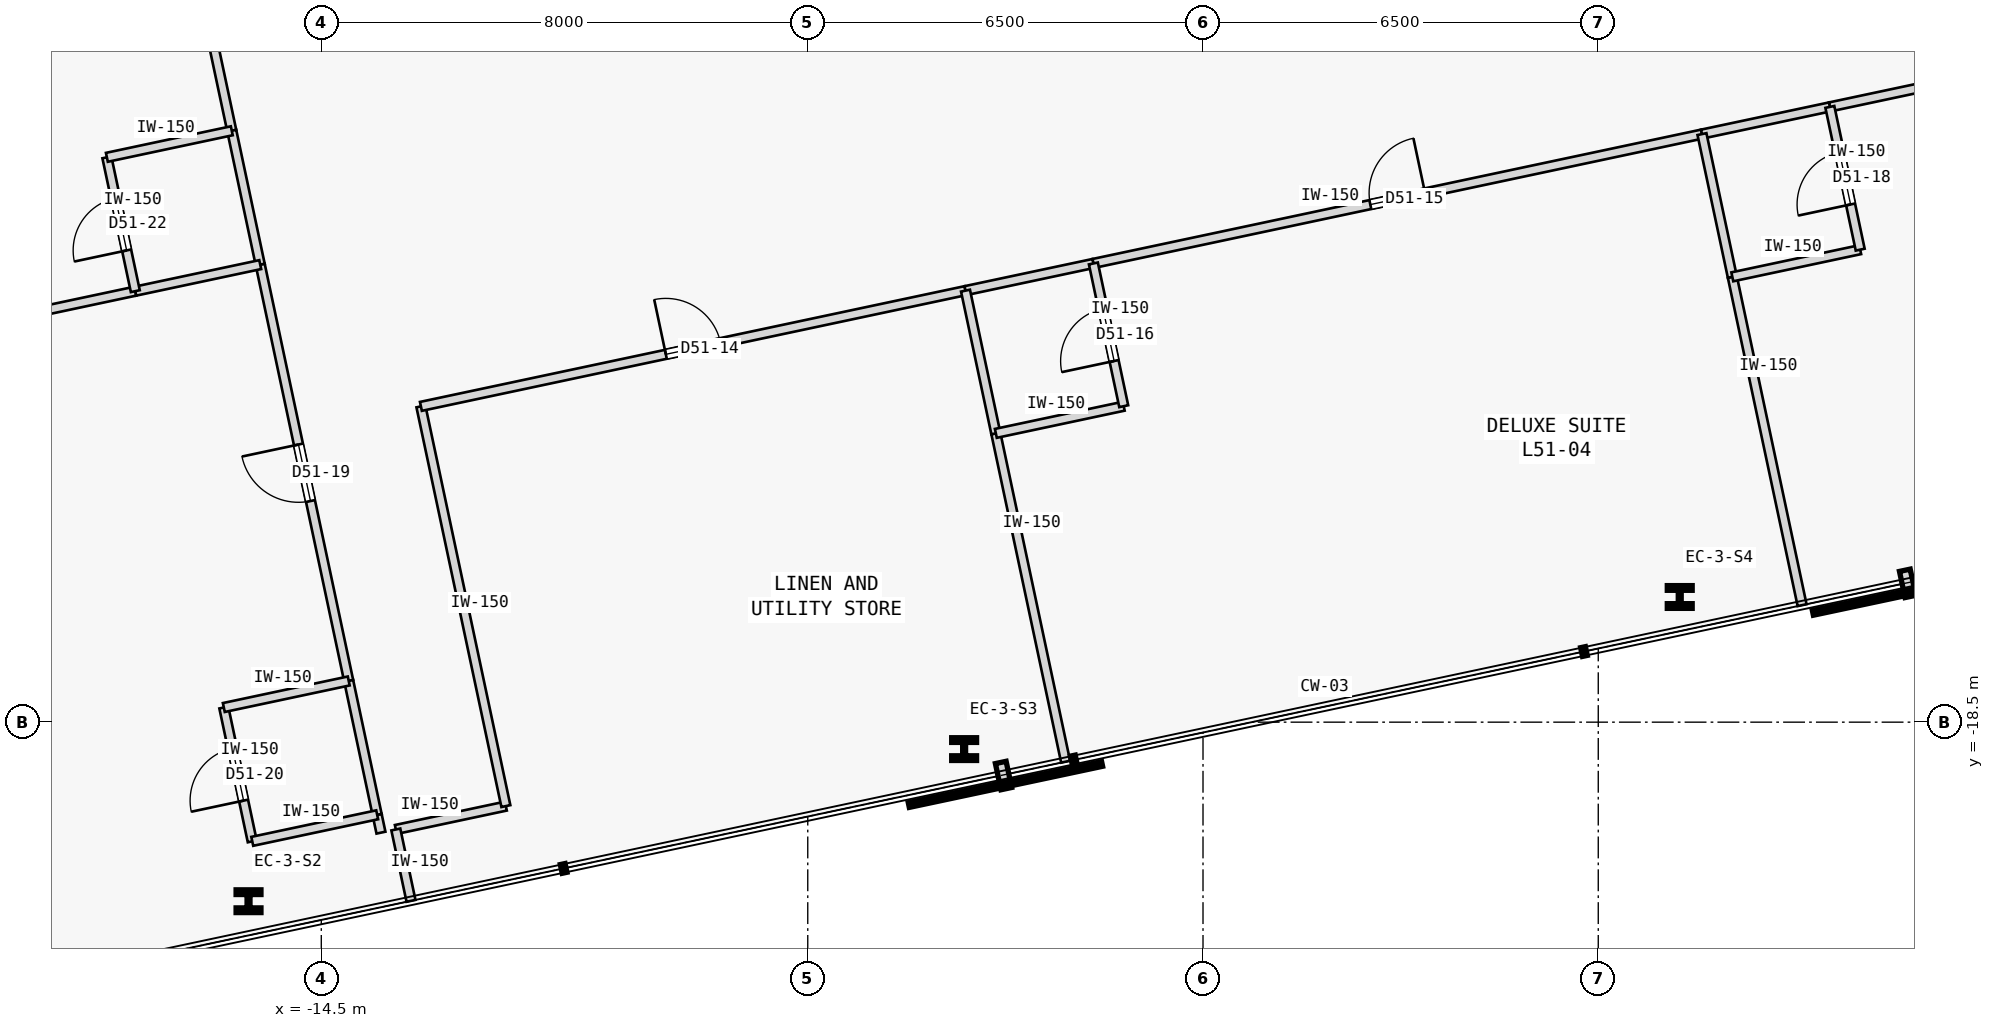
"""IFC4 building model, lengths in metres.
Left out: names, types, materials, properties, quantities, classifications, styles, units other than length and angle.
Written with IfcOpenShell. Run it as: python <this file> out.ifc"""

import sys

from ifc_helpers import new_model, si_unit, direction, frame, frame_2d, origin, origin_2d, place, context, subcontext, project, spatial, rectangle, i_section, extrude, element, fill, save


model = new_model("IFC4")
c1 = context("Model", 3, precision=1e-05, world=origin(), true_north=direction((0.0, 1.0)))
c2 = subcontext(c1, "Body", "Model", "MODEL_VIEW")
j1 = project(units=[si_unit("LENGTHUNIT", "METRE"), si_unit("PLANEANGLEUNIT", "RADIAN")], contexts=[c1])
p1 = place(None, origin())
s1 = spatial("IfcSite", under=j1, at=p1, CompositionType="ELEMENT")
p2 = place(p1, origin())
s2 = spatial("IfcBuilding", under=s1, at=p2, CompositionType="ELEMENT")
p3 = place(p2, frame((0.0, 0.0, 195.6)))
s3 = spatial("IfcBuildingStorey", under=s2, at=p3, CompositionType="ELEMENT", Elevation=195.6)
for number, where, z_axis, x_axis in (
    (1, (-15.697, -21.444, 0.0), (0.0, 0.0, 1.0), (1.0, 0.0, 0.0)),
    (2, (-3.928, -18.943, 0.0), (0.0, 0.0, 1.0), (1.0, 0.0, 0.0)),
    (3, (7.84, -16.441, 0.0), (0.0, 0.0, 1.0), (1.0, 0.0, 0.0)),
):
    element("IfcColumn", number, at=place(p3, frame(where, z_axis=z_axis, x_axis=x_axis)), inside=s3, PredefinedType="COLUMN", context=c2, shape_type="SweptSolid", body=[
        extrude(i_section(OverallWidth=0.409, OverallDepth=0.374, WebThickness=0.048, FlangeThickness=0.077, FilletRadius=0.015, at=origin_2d()), origin(), (0.0, 0.0, 1.0), 3.4),
    ])
p4 = place(p3, frame((-13.274, -20.265, 0.0), z_axis=(0.0, 0.0, 1.0), x_axis=(0.978160192495, 0.207852442415, 0.0)))
e4 = element("IfcWall", 4, at=p4, inside=s3, PredefinedType="PARTITIONING", context=c2, shape_type="SweptSolid", body=[
    extrude(rectangle(XDim=1.85, YDim=0.15, at=frame_2d((0.925, 0.0))), origin(), (0.0, 0.0, 1.0), 3.175),
])
p5 = place(p3, frame((-11.465, -19.88, 0.0), z_axis=(0.0, 0.0, 1.0), x_axis=(-0.207916109912, 0.978146661416, 0.0)))
e5 = element("IfcWall", 5, at=p5, inside=s3, PredefinedType="PARTITIONING", context=c2, shape_type="SweptSolid", body=[
    extrude(rectangle(XDim=6.72, YDim=0.15, at=frame_2d((3.36, 0.0))), origin(), (0.0, 0.0, 1.0), 3.175),
])
p6 = place(p3, frame((-12.862, -13.307, 0.0), z_axis=(0.0, 0.0, 1.0), x_axis=(0.978149904805, 0.207900850719, 0.0)))
e6 = element("IfcWall", 6, at=p6, inside=s3, PredefinedType="PARTITIONING", context=c2, shape_type="SweptSolid", body=[
    extrude(rectangle(XDim=9.156, YDim=0.15, at=frame_2d((4.578, 0.0))), origin(), (0.0, 0.0, 1.0), 3.175),
])
p7 = place(p6, frame((4.118, 0.0, 0.0)))
e7 = element("IfcOpeningElement", 7, at=p7, cuts=e6, PredefinedType="OPENING", context=c2, shape_type="SweptSolid", body=[
    extrude(rectangle(XDim=0.92, YDim=2.15, at=frame_2d((0.46, 1.075))), frame((0.0, 0.085, 0.0), z_axis=(0.0, -1.0, 0.0), x_axis=(1.0, 0.0, 0.0)), (0.0, 0.0, 1.0), 0.17),
])
p8 = place(p3, frame((-1.803, -10.957, 0.0), z_axis=(0.0, 0.0, 1.0), x_axis=(0.978145386425, 0.207922108048, 0.0)))
e8 = element("IfcWall", 8, at=p8, inside=s3, PredefinedType="PARTITIONING", context=c2, shape_type="SweptSolid", body=[
    extrude(rectangle(XDim=10.232, YDim=0.15, at=frame_2d((5.116, 0.0))), origin(), (0.0, 0.0, 1.0), 3.175),
])
p9 = place(p8, frame((4.656, 0.0, 0.0)))
e9 = element("IfcOpeningElement", 9, at=p9, cuts=e8, PredefinedType="OPENING", context=c2, shape_type="SweptSolid", body=[
    extrude(rectangle(XDim=0.92, YDim=2.15, at=frame_2d((0.46, 1.075))), frame((0.0, 0.085, 0.0), z_axis=(0.0, -1.0, 0.0), x_axis=(1.0, 0.0, 0.0)), (0.0, 0.0, 1.0), 0.17),
])
p10 = place(p3, frame((-3.906, -11.404, 0.0), z_axis=(0.0, 0.0, 1.0), x_axis=(0.978146728319, 0.207915795165, 0.0)))
e10 = element("IfcWall", 10, at=p10, inside=s3, PredefinedType="PARTITIONING", context=c2, shape_type="SweptSolid", body=[
    extrude(rectangle(XDim=2.15, YDim=0.15, at=frame_2d((1.075, 0.0))), origin(), (0.0, 0.0, 1.0), 3.175),
])
p11 = place(p3, frame((10.309, -8.382, 0.0), z_axis=(0.0, 0.0, 1.0), x_axis=(0.978149817889, 0.207901259648, 0.0)))
e11 = element("IfcWall", 11, at=p11, inside=s3, PredefinedType="PARTITIONING", context=c2, shape_type="SweptSolid", body=[
    extrude(rectangle(XDim=7.007, YDim=0.15, at=frame_2d((3.503, 0.0))), origin(), (0.0, 0.0, 1.0), 3.175),
])
p12 = place(p11, frame((3.043, 0.0, 0.0)))
e12 = element("IfcOpeningElement", 12, at=p12, cuts=e11, PredefinedType="OPENING", context=c2, shape_type="SweptSolid", body=[
    extrude(rectangle(XDim=0.92, YDim=2.15, at=frame_2d((0.46, 1.075))), frame((0.0, 0.085, 0.0), z_axis=(0.0, -1.0, 0.0), x_axis=(1.0, 0.0, 0.0)), (0.0, 0.0, 1.0), 0.17),
])
p13 = place(p3, frame((8.206, -8.829, 0.0), z_axis=(0.0, 0.0, 1.0), x_axis=(0.978146728319, 0.207915795165, 0.0)))
e13 = element("IfcWall", 13, at=p13, inside=s3, PredefinedType="PARTITIONING", context=c2, shape_type="SweptSolid", body=[
    extrude(rectangle(XDim=2.15, YDim=0.15, at=frame_2d((1.075, 0.0))), origin(), (0.0, 0.0, 1.0), 3.175),
])
p14 = place(p3, frame((-13.519, -20.317, 0.0), z_axis=(0.0, 0.0, 1.0), x_axis=(-0.207527808066, 0.978229118806, 0.0)))
e14 = element("IfcWall", 14, at=p14, inside=s3, PredefinedType="PARTITIONING", context=c2, shape_type="SweptSolid", body=[
    extrude(rectangle(XDim=0.3, YDim=0.15, at=frame_2d((0.15, 0.0))), origin(), (0.0, 0.0, 1.0), 3.175),
])
p15 = place(p3, frame((-14.049, -17.823, 0.0), z_axis=(0.0, 0.0, 1.0), x_axis=(-0.207940096132, 0.978141562567, 0.0)))
e15 = element("IfcWall", 15, at=p15, inside=s3, PredefinedType="PARTITIONING", context=c2, shape_type="SweptSolid", body=[
    extrude(rectangle(XDim=7.0, YDim=0.15, at=frame_2d((3.5, 0.0))), origin(), (0.0, 0.0, 1.0), 3.175),
])
p16 = place(p15, frame((3.025, 0.0, 0.0)))
e16 = element("IfcOpeningElement", 16, at=p16, cuts=e15, PredefinedType="OPENING", context=c2, shape_type="SweptSolid", body=[
    extrude(rectangle(XDim=0.95, YDim=2.15, at=frame_2d((0.475, 1.075))), frame((0.0, 0.085, 0.0), z_axis=(0.0, -1.0, 0.0), x_axis=(1.0, 0.0, 0.0)), (0.0, 0.0, 1.0), 0.17),
])
p17 = place(p3, frame((-13.581, -20.023, 0.0), z_axis=(0.0, 0.0, 1.0), x_axis=(-0.207891197838, 0.978151956427, 0.0)))
e17 = element("IfcWall", 17, at=p17, inside=s3, PredefinedType="PARTITIONING", context=c2, shape_type="SweptSolid", body=[
    extrude(rectangle(XDim=2.25, YDim=0.15, at=frame_2d((1.125, 0.0))), origin(), (0.0, 0.0, 1.0), 3.175),
])
p18 = place(p3, frame((-15.972, -8.775, 0.0), z_axis=(0.0, 0.0, 1.0), x_axis=(-0.207894825434, 0.97815118543, 0.0)))
e18 = element("IfcWall", 18, at=p18, inside=s3, PredefinedType="PARTITIONING", context=c2, shape_type="SweptSolid", body=[
    extrude(rectangle(XDim=8.5, YDim=0.15, at=frame_2d((4.25, 0.0))), origin(), (0.0, 0.0, 1.0), 3.175),
])
p19 = place(p18, frame((5.05, 0.0, 0.0)))
e19 = element("IfcOpeningElement", 19, at=p19, cuts=e18, PredefinedType="OPENING", context=c2, shape_type="SweptSolid", body=[
    extrude(rectangle(XDim=0.95, YDim=2.15, at=frame_2d((0.475, 1.075))), frame((0.0, 0.085, 0.0), z_axis=(0.0, -1.0, 0.0), x_axis=(1.0, 0.0, 0.0)), (0.0, 0.0, 1.0), 0.17),
])
p20 = place(p3, frame((-15.504, -10.976, 0.0), z_axis=(0.0, 0.0, 1.0), x_axis=(-0.207891197838, 0.978151956427, 0.0)))
e20 = element("IfcWall", 20, at=p20, inside=s3, PredefinedType="PARTITIONING", context=c2, shape_type="SweptSolid", body=[
    extrude(rectangle(XDim=2.25, YDim=0.15, at=frame_2d((1.125, 0.0))), origin(), (0.0, 0.0, 1.0), 3.175),
])
p21 = place(p3, frame((-2.259, -19.15, 0.0), z_axis=(0.0, 0.0, 1.0), x_axis=(-0.20791588359, 0.978146709523, 0.0)))
e21 = element("IfcWall", 21, at=p21, inside=s3, PredefinedType="PARTITIONING", context=c2, shape_type="SweptSolid", body=[
    extrude(rectangle(XDim=5.52, YDim=0.15, at=frame_2d((2.76, 0.0))), origin(), (0.0, 0.0, 1.0), 3.175),
])
p22 = place(p3, frame((-3.407, -13.751, 0.0), z_axis=(0.0, 0.0, 1.0), x_axis=(-0.207840504985, 0.978162729042, 0.0)))
e22 = element("IfcWall", 22, at=p22, inside=s3, PredefinedType="PARTITIONING", context=c2, shape_type="SweptSolid", body=[
    extrude(rectangle(XDim=2.4, YDim=0.15, at=frame_2d((1.2, 0.0))), origin(), (0.0, 0.0, 1.0), 3.175),
])
p23 = place(p3, frame((-13.025, -21.439, 0.0), z_axis=(0.0, 0.0, 1.0), x_axis=(-0.207917150959, 0.978146440129, 0.0)))
e23 = element("IfcWall", 23, at=p23, inside=s3, PredefinedType="PARTITIONING", context=c2, shape_type="SweptSolid", body=[
    extrude(rectangle(XDim=1.2, YDim=0.15, at=frame_2d((0.6, 0.0))), origin(), (0.0, 0.0, 1.0), 3.175),
])
p24 = place(p3, frame((-3.407, -13.751, 0.0), z_axis=(0.0, 0.0, 1.0), x_axis=(0.978151636287, 0.207892704126, 0.0)))
e24 = element("IfcWall", 24, at=p24, inside=s3, PredefinedType="PARTITIONING", context=c2, shape_type="SweptSolid", body=[
    extrude(rectangle(XDim=2.15, YDim=0.15, at=frame_2d((1.075, 0.0))), origin(), (0.0, 0.0, 1.0), 3.175),
])
p25 = place(p3, frame((-1.304, -13.304, 0.0), z_axis=(0.0, 0.0, 1.0), x_axis=(-0.207937840262, 0.978142042133, 0.0)))
e25 = element("IfcWall", 25, at=p25, inside=s3, PredefinedType="PARTITIONING", context=c2, shape_type="SweptSolid", body=[
    extrude(rectangle(XDim=2.4, YDim=0.15, at=frame_2d((1.2, 0.0))), origin(), (0.0, 0.0, 1.0), 3.175),
])
p26 = place(p25, frame((0.76, 0.0, 0.0)))
e26 = element("IfcOpeningElement", 26, at=p26, cuts=e25, PredefinedType="OPENING", context=c2, shape_type="SweptSolid", body=[
    extrude(rectangle(XDim=0.88, YDim=2.15, at=frame_2d((0.44, 1.075))), frame((0.0, 0.085, 0.0), z_axis=(0.0, -1.0, 0.0), x_axis=(1.0, 0.0, 0.0)), (0.0, 0.0, 1.0), 0.17),
])
p27 = place(p3, frame((9.852, -16.576, 0.0), z_axis=(0.0, 0.0, 1.0), x_axis=(-0.20792487872, 0.978144797466, 0.0)))
e27 = element("IfcWall", 27, at=p27, inside=s3, PredefinedType="PARTITIONING", context=c2, shape_type="SweptSolid", body=[
    extrude(rectangle(XDim=5.52, YDim=0.15, at=frame_2d((2.76, 0.0))), origin(), (0.0, 0.0, 1.0), 3.175),
])
p28 = place(p3, frame((8.705, -11.177, 0.0), z_axis=(0.0, 0.0, 1.0), x_axis=(-0.207917150959, 0.978146440129, 0.0)))
e28 = element("IfcWall", 28, at=p28, inside=s3, PredefinedType="PARTITIONING", context=c2, shape_type="SweptSolid", body=[
    extrude(rectangle(XDim=2.4, YDim=0.15, at=frame_2d((1.2, 0.0))), origin(), (0.0, 0.0, 1.0), 3.175),
])
p29 = place(p3, frame((8.705, -11.177, 0.0), z_axis=(0.0, 0.0, 1.0), x_axis=(0.978123629285, 0.208024435669, 0.0)))
e29 = element("IfcWall", 29, at=p29, inside=s3, PredefinedType="PARTITIONING", context=c2, shape_type="SweptSolid", body=[
    extrude(rectangle(XDim=2.15, YDim=0.15, at=frame_2d((1.075, 0.0))), origin(), (0.0, 0.0, 1.0), 3.175),
])
p30 = place(p3, frame((10.808, -10.729, 0.0), z_axis=(0.0, 0.0, 1.0), x_axis=(-0.207937840262, 0.978142042133, 0.0)))
e30 = element("IfcWall", 30, at=p30, inside=s3, PredefinedType="PARTITIONING", context=c2, shape_type="SweptSolid", body=[
    extrude(rectangle(XDim=2.4, YDim=0.15, at=frame_2d((1.2, 0.0))), origin(), (0.0, 0.0, 1.0), 3.175),
])
p31 = place(p30, frame((0.76, 0.0, 0.0)))
e31 = element("IfcOpeningElement", 31, at=p31, cuts=e30, PredefinedType="OPENING", context=c2, shape_type="SweptSolid", body=[
    extrude(rectangle(XDim=0.88, YDim=2.15, at=frame_2d((0.44, 1.075))), frame((0.0, 0.085, 0.0), z_axis=(0.0, -1.0, 0.0), x_axis=(1.0, 0.0, 0.0)), (0.0, 0.0, 1.0), 0.17),
])
p32 = place(p3, frame((-15.635, -20.46, 0.0), z_axis=(0.0, 0.0, 1.0), x_axis=(-0.207913264065, 0.978147266328, 0.0)))
e32 = element("IfcWall", 32, at=p32, inside=s3, PredefinedType="PARTITIONING", context=c2, shape_type="SweptSolid", body=[
    extrude(rectangle(XDim=2.25, YDim=0.15, at=frame_2d((1.125, 0.0))), origin(), (0.0, 0.0, 1.0), 3.175),
])
p33 = place(p32, frame((0.685, 0.0, 0.0)))
e33 = element("IfcOpeningElement", 33, at=p33, cuts=e32, PredefinedType="OPENING", context=c2, shape_type="SweptSolid", body=[
    extrude(rectangle(XDim=0.88, YDim=2.15, at=frame_2d((0.44, 1.075))), frame((0.0, 0.085, 0.0), z_axis=(0.0, -1.0, 0.0), x_axis=(1.0, 0.0, 0.0)), (0.0, 0.0, 1.0), 0.17),
])
for number, where, z_axis, x_axis in (
    (34, (-15.635, -20.46, 0.0), (0.0, 0.0, 1.0), (0.978, 0.208, 0.0)),
    (35, (-16.103, -18.259, 0.0), (0.0, 0.0, 1.0), (0.978, 0.208, 0.0)),
):
    element("IfcWall", number, at=place(p3, frame(where, z_axis=z_axis, x_axis=x_axis)), inside=s3, PredefinedType="PARTITIONING", context=c2, shape_type="SweptSolid", body=[
        extrude(rectangle(XDim=2.1, YDim=0.15, at=frame_2d((1.05, 0.0))), origin(), (0.0, 0.0, 1.0), 3.175),
    ])
p34 = place(p3, frame((-32.933, -14.68, 0.0), z_axis=(0.0, 0.0, 1.0), x_axis=(0.978146137903, 0.207918572776, 0.0)))
e36 = element("IfcWall", 36, at=p34, inside=s3, PredefinedType="PARTITIONING", context=c2, shape_type="SweptSolid", body=[
    extrude(rectangle(XDim=15.718, YDim=0.15, at=frame_2d((7.859, 0.0))), origin(), (0.0, 0.0, 1.0), 3.175),
])
p35 = place(p3, frame((-17.558, -11.412, 0.0), z_axis=(0.0, 0.0, 1.0), x_axis=(0.978153236239, 0.207885176084, 0.0)))
e37 = element("IfcWall", 37, at=p35, inside=s3, PredefinedType="PARTITIONING", context=c2, shape_type="SweptSolid", body=[
    extrude(rectangle(XDim=2.1, YDim=0.15, at=frame_2d((1.05, 0.0))), origin(), (0.0, 0.0, 1.0), 3.175),
])
p36 = place(p3, frame((-17.558, -11.412, 0.0), z_axis=(0.0, 0.0, 1.0), x_axis=(-0.207891197838, 0.978151956427, 0.0)))
e38 = element("IfcWall", 38, at=p36, inside=s3, PredefinedType="PARTITIONING", context=c2, shape_type="SweptSolid", body=[
    extrude(rectangle(XDim=2.25, YDim=0.15, at=frame_2d((1.125, 0.0))), origin(), (0.0, 0.0, 1.0), 3.175),
])
p37 = place(p36, frame((0.685, 0.0, 0.0)))
e39 = element("IfcOpeningElement", 39, at=p37, cuts=e38, PredefinedType="OPENING", context=c2, shape_type="SweptSolid", body=[
    extrude(rectangle(XDim=0.88, YDim=2.15, at=frame_2d((0.44, 1.075))), frame((0.0, 0.085, 0.0), z_axis=(0.0, -1.0, 0.0), x_axis=(1.0, 0.0, 0.0)), (0.0, 0.0, 1.0), 0.17),
])
p38 = place(p3, frame((-18.026, -9.211, 0.0), z_axis=(0.0, 0.0, 1.0), x_axis=(0.978153236239, 0.207885176084, 0.0)))
e40 = element("IfcWall", 40, at=p38, inside=s3, PredefinedType="PARTITIONING", context=c2, shape_type="SweptSolid", body=[
    extrude(rectangle(XDim=2.1, YDim=0.15, at=frame_2d((1.05, 0.0))), origin(), (0.0, 0.0, 1.0), 3.175),
])
p39 = place(p7, origin())
e41 = element("IfcDoor", 41, at=p39, inside=s3, OperationType="SINGLE_SWING_LEFT", PredefinedType="DOOR", context=c2, shape_type="SweptSolid", body=[
    extrude(rectangle(XDim=0.92, YDim=2.15, at=frame_2d((0.46, 1.075))), frame((0.0, 0.025, 0.0), z_axis=(0.0, -1.0, 0.0), x_axis=(1.0, 0.0, 0.0)), (0.0, 0.0, 1.0), 0.05),
])
fill(e7, e41)
p40 = place(p9, origin())
e42 = element("IfcDoor", 42, at=p40, inside=s3, OperationType="SINGLE_SWING_RIGHT", PredefinedType="DOOR", context=c2, shape_type="SweptSolid", body=[
    extrude(rectangle(XDim=0.92, YDim=2.15, at=frame_2d((0.46, 1.075))), frame((0.0, 0.025, 0.0), z_axis=(0.0, -1.0, 0.0), x_axis=(1.0, 0.0, 0.0)), (0.0, 0.0, 1.0), 0.05),
])
fill(e9, e42)
p41 = place(p26, origin())
e43 = element("IfcDoor", 43, at=p41, inside=s3, OperationType="SINGLE_SWING_LEFT", PredefinedType="DOOR", context=c2, shape_type="SweptSolid", body=[
    extrude(rectangle(XDim=0.88, YDim=2.15, at=frame_2d((0.44, 1.075))), frame((0.0, 0.025, 0.0), z_axis=(0.0, -1.0, 0.0), x_axis=(1.0, 0.0, 0.0)), (0.0, 0.0, 1.0), 0.05),
])
fill(e26, e43)
p42 = place(p31, origin())
e44 = element("IfcDoor", 44, at=p42, inside=s3, OperationType="SINGLE_SWING_LEFT", PredefinedType="DOOR", context=c2, shape_type="SweptSolid", body=[
    extrude(rectangle(XDim=0.88, YDim=2.15, at=frame_2d((0.44, 1.075))), frame((0.0, 0.025, 0.0), z_axis=(0.0, -1.0, 0.0), x_axis=(1.0, 0.0, 0.0)), (0.0, 0.0, 1.0), 0.05),
])
fill(e31, e44)
p43 = place(p16, origin())
e45 = element("IfcDoor", 45, at=p43, inside=s3, OperationType="SINGLE_SWING_RIGHT", PredefinedType="DOOR", context=c2, shape_type="SweptSolid", body=[
    extrude(rectangle(XDim=0.95, YDim=2.15, at=frame_2d((0.475, 1.075))), frame((0.0, 0.025, 0.0), z_axis=(0.0, -1.0, 0.0), x_axis=(1.0, 0.0, 0.0)), (0.0, 0.0, 1.0), 0.05),
])
fill(e16, e45)
p44 = place(p33, origin())
e46 = element("IfcDoor", 46, at=p44, inside=s3, OperationType="SINGLE_SWING_LEFT", PredefinedType="DOOR", context=c2, shape_type="SweptSolid", body=[
    extrude(rectangle(XDim=0.88, YDim=2.15, at=frame_2d((0.44, 1.075))), frame((0.0, 0.025, 0.0), z_axis=(0.0, -1.0, 0.0), x_axis=(1.0, 0.0, 0.0)), (0.0, 0.0, 1.0), 0.05),
])
fill(e33, e46)
p45 = place(p37, origin())
e47 = element("IfcDoor", 47, at=p45, inside=s3, OperationType="SINGLE_SWING_LEFT", PredefinedType="DOOR", context=c2, shape_type="SweptSolid", body=[
    extrude(rectangle(XDim=0.88, YDim=2.15, at=frame_2d((0.44, 1.075))), frame((0.0, 0.025, 0.0), z_axis=(0.0, -1.0, 0.0), x_axis=(1.0, 0.0, 0.0)), (0.0, 0.0, 1.0), 0.05),
])
fill(e39, e47)
save(model, sys.argv[1])
